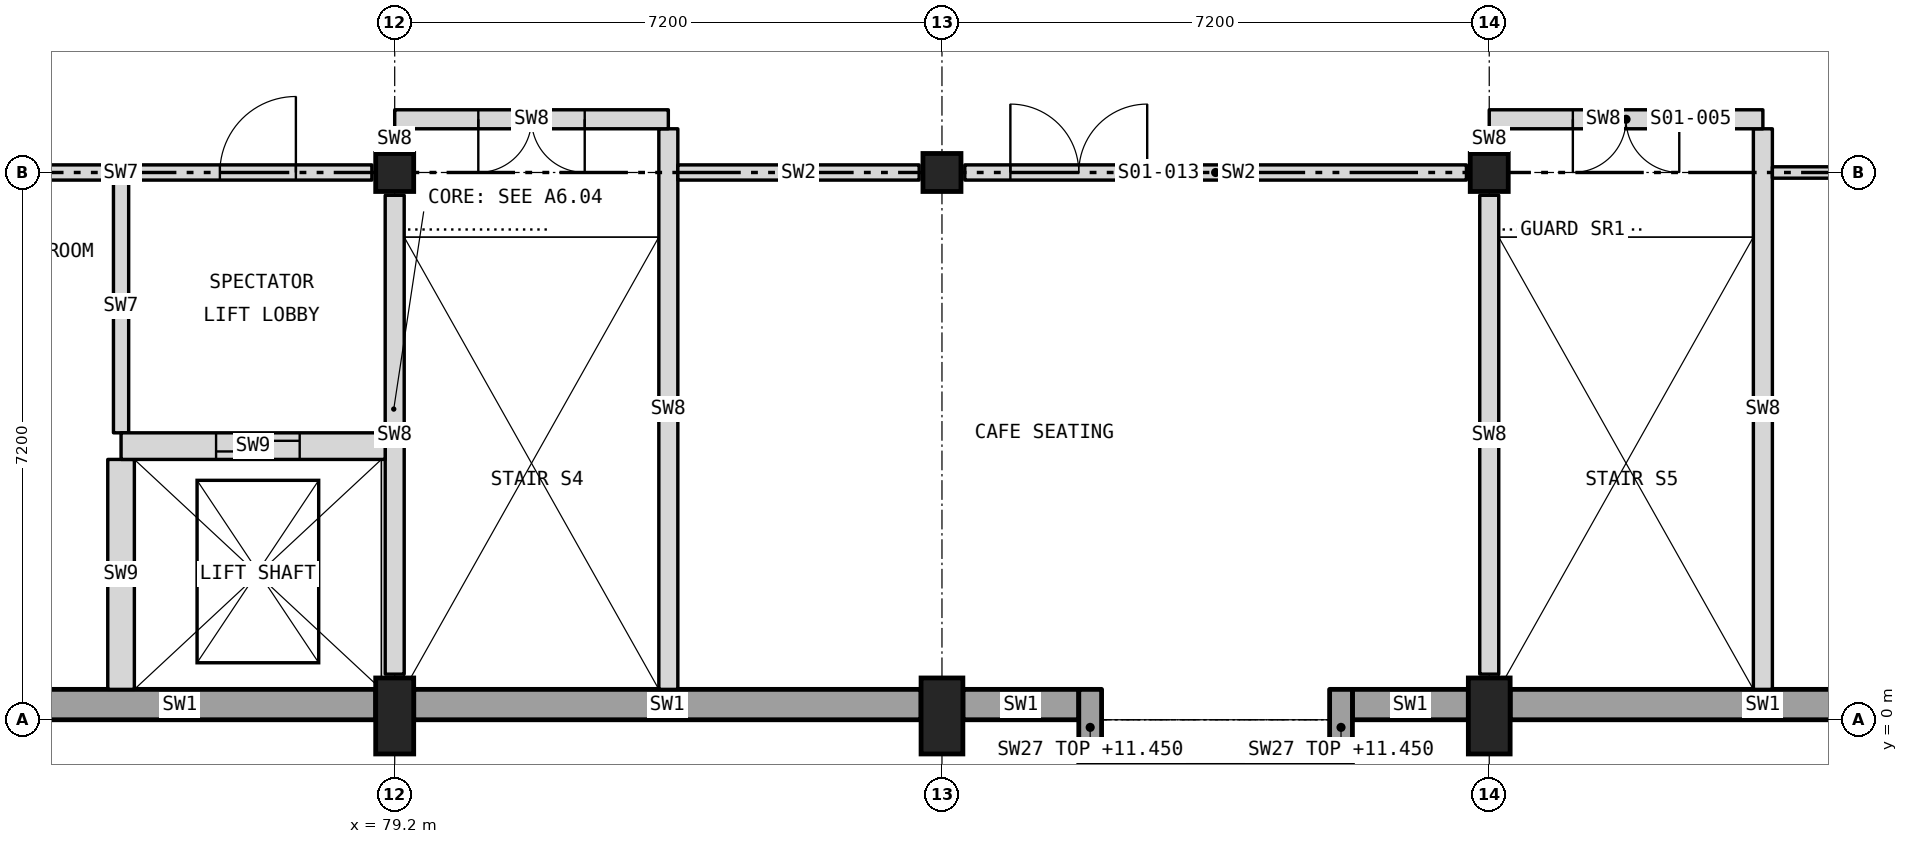
"""IFC4 building model, lengths in metres.
Left out: names, types, materials, properties, quantities, classifications, styles, units other than length and angle.
Written with IfcOpenShell. Run it as: python <this file> out.ifc"""

import sys

from ifc_helpers import new_model, si_unit, direction, frame, frame_2d, origin, origin_2d, place, context, subcontext, project, spatial, rectangle, extrude, element, fill, save


model = new_model("IFC4")
c1 = context("Model", 3, precision=1e-05, world=origin(), true_north=direction((0.0, 1.0)))
c2 = subcontext(c1, "Body", "Model", "MODEL_VIEW")
j1 = project(units=[si_unit("LENGTHUNIT", "METRE"), si_unit("PLANEANGLEUNIT", "RADIAN")], contexts=[c1])
p1 = place(None, origin())
s1 = spatial("IfcSite", under=j1, at=p1, CompositionType="ELEMENT")
p2 = place(p1, origin())
s2 = spatial("IfcBuilding", under=s1, at=p2, CompositionType="ELEMENT")
p3 = place(p2, frame((0.0, 0.0, 6.0)))
s3 = spatial("IfcBuildingStorey", under=s2, at=p3, CompositionType="ELEMENT", Elevation=6.0)
p4 = place(p3, frame((79.2, 0.05, 0.0), z_axis=(0.0, 0.0, 1.0), x_axis=(1.0, 0.0, 0.0)))
e1 = element("IfcColumn", 1, at=p4, inside=s3, PredefinedType="COLUMN", context=c2, shape_type="SweptSolid", body=[
    extrude(rectangle(XDim=0.5, YDim=1.0, at=origin_2d()), origin(), (0.0, 0.0, 1.0), 6.0),
])
p5 = place(p3, frame((79.2, 7.2, 0.0), z_axis=(0.0, 0.0, 1.0), x_axis=(1.0, 0.0, 0.0)))
e2 = element("IfcColumn", 2, at=p5, inside=s3, PredefinedType="COLUMN", context=c2, shape_type="SweptSolid", body=[
    extrude(rectangle(XDim=0.5, YDim=0.5, at=origin_2d()), origin(), (0.0, 0.0, 1.0), 6.0),
])
p6 = place(p3, frame((86.4, 0.05, 0.0), z_axis=(0.0, 0.0, 1.0), x_axis=(1.0, 0.0, 0.0)))
e3 = element("IfcColumn", 3, at=p6, inside=s3, PredefinedType="COLUMN", context=c2, shape_type="SweptSolid", body=[
    extrude(rectangle(XDim=0.55, YDim=1.0, at=origin_2d()), origin(), (0.0, 0.0, 1.0), 6.0),
])
p7 = place(p3, frame((86.4, 7.2, 0.0), z_axis=(0.0, 0.0, 1.0), x_axis=(1.0, 0.0, 0.0)))
e4 = element("IfcColumn", 4, at=p7, inside=s3, PredefinedType="COLUMN", context=c2, shape_type="SweptSolid", body=[
    extrude(rectangle(XDim=0.5, YDim=0.5, at=origin_2d()), origin(), (0.0, 0.0, 1.0), 6.0),
])
p8 = place(p3, frame((93.6, 0.05, 0.0), z_axis=(0.0, 0.0, 1.0), x_axis=(1.0, 0.0, 0.0)))
e5 = element("IfcColumn", 5, at=p8, inside=s3, PredefinedType="COLUMN", context=c2, shape_type="SweptSolid", body=[
    extrude(rectangle(XDim=0.55, YDim=1.0, at=origin_2d()), origin(), (0.0, 0.0, 1.0), 6.0),
])
p9 = place(p3, frame((93.6, 7.2, 0.0), z_axis=(0.0, 0.0, 1.0), x_axis=(1.0, 0.0, 0.0)))
e6 = element("IfcColumn", 6, at=p9, inside=s3, PredefinedType="COLUMN", context=c2, shape_type="SweptSolid", body=[
    extrude(rectangle(XDim=0.5, YDim=0.5, at=origin_2d()), origin(), (0.0, 0.0, 1.0), 6.0),
])
p10 = place(p3, frame((73.8, 0.2, 0.0), z_axis=(0.0, 0.0, 1.0), x_axis=(1.0, 0.0, 0.0)))
e7 = element("IfcWall", 7, at=p10, inside=s3, PredefinedType="SOLIDWALL", context=c2, shape_type="SweptSolid", body=[
    extrude(rectangle(XDim=5.15, YDim=0.4, at=frame_2d((2.575, 0.0))), origin(), (0.0, 0.0, 1.0), 5.725),
])
p11 = place(p3, frame((79.45, 0.2, 0.0), z_axis=(0.0, 0.0, 1.0), x_axis=(1.0, 0.0, 0.0)))
e8 = element("IfcWall", 8, at=p11, inside=s3, PredefinedType="SOLIDWALL", context=c2, shape_type="SweptSolid", body=[
    extrude(rectangle(XDim=6.675, YDim=0.4, at=frame_2d((3.337, 0.0))), origin(), (0.0, 0.0, 1.0), 5.725),
])
for number, where, z_axis, x_axis in (
    (9, (86.675, 0.2, 0.0), (0.0, 0.0, 1.0), (1.0, 0.0, 0.0)),
    (10, (91.8, 0.2, 0.0), (0.0, 0.0, 1.0), (1.0, 0.0, 0.0)),
):
    element("IfcWall", number, at=place(p3, frame(where, z_axis=z_axis, x_axis=x_axis)), inside=s3, PredefinedType="SOLIDWALL", context=c2, shape_type="SweptSolid", body=[
        extrude(rectangle(XDim=1.525, YDim=0.4, at=frame_2d((0.762, 0.0))), origin(), (0.0, 0.0, 1.0), 5.725),
    ])
p12 = place(p3, frame((93.875, 0.2, 0.0), z_axis=(0.0, 0.0, 1.0), x_axis=(1.0, 0.0, 0.0)))
e11 = element("IfcWall", 11, at=p12, inside=s3, PredefinedType="SOLIDWALL", context=c2, shape_type="SweptSolid", body=[
    extrude(rectangle(XDim=6.65, YDim=0.4, at=frame_2d((3.325, 0.0))), origin(), (0.0, 0.0, 1.0), 5.725),
])
p13 = place(p3, frame((88.2, -0.75, 0.0), z_axis=(0.0, 0.0, 1.0), x_axis=(1.0, 0.0, 0.0)))
e12 = element("IfcWall", 12, at=p13, inside=s3, PredefinedType="SOLIDWALL", context=c2, shape_type="SweptSolid", body=[
    extrude(rectangle(XDim=3.6, YDim=0.3, at=frame_2d((1.8, 0.0))), origin(), (0.0, 0.0, 1.0), 5.45),
])
p14 = place(p13, frame((0.3, 0.0, 0.9)))
e13 = element("IfcOpeningElement", 13, at=p14, cuts=e12, PredefinedType="OPENING", context=c2, shape_type="SweptSolid", body=[
    extrude(rectangle(XDim=1.2, YDim=3.6, at=frame_2d((0.6, 1.8))), frame((0.0, 0.16, 0.0), z_axis=(0.0, -1.0, 0.0), x_axis=(1.0, 0.0, 0.0)), (0.0, 0.0, 1.0), 0.32),
])
p15 = place(p13, frame((2.1, 0.0, 0.9)))
e14 = element("IfcOpeningElement", 14, at=p15, cuts=e12, PredefinedType="OPENING", context=c2, shape_type="SweptSolid", body=[
    extrude(rectangle(XDim=1.2, YDim=3.6, at=frame_2d((0.6, 1.8))), frame((0.0, 0.16, 0.0), z_axis=(0.0, -1.0, 0.0), x_axis=(1.0, 0.0, 0.0)), (0.0, 0.0, 1.0), 0.32),
])
for number, where, z_axis, x_axis in (
    (15, (88.35, -0.6, 0.0), (0.0, 0.0, 1.0), (0.0, 1.0, 0.0)),
    (16, (91.65, -0.6, 0.0), (0.0, 0.0, 1.0), (0.0, 1.0, 0.0)),
):
    element("IfcWall", number, at=place(p3, frame(where, z_axis=z_axis, x_axis=x_axis)), inside=s3, PredefinedType="SOLIDWALL", context=c2, shape_type="SweptSolid", body=[
        extrude(rectangle(XDim=1.0, YDim=0.3, at=frame_2d((0.5, 0.0))), origin(), (0.0, 0.0, 1.0), 5.45),
    ])
p16 = place(p3, frame((75.6, 0.4, 0.0), z_axis=(0.0, 0.0, 1.0), x_axis=(0.0, 1.0, 0.0)))
e17 = element("IfcWall", 17, at=p16, inside=s3, PredefinedType="SOLIDWALL", context=c2, shape_type="SweptSolid", body=[
    extrude(rectangle(XDim=3.025, YDim=0.35, at=frame_2d((1.513, 0.0))), origin(), (0.0, 0.0, 1.0), 5.725),
])
p17 = place(p3, frame((75.6, 3.775, 0.0), z_axis=(0.0, 0.0, 1.0), x_axis=(0.0, 1.0, 0.0)))
e18 = element("IfcWall", 18, at=p17, inside=s3, PredefinedType="PARTITIONING", context=c2, shape_type="SweptSolid", body=[
    extrude(rectangle(XDim=3.325, YDim=0.2, at=frame_2d((1.663, 0.0))), origin(), (0.0, 0.0, 1.0), 5.725),
])
p18 = place(p3, frame((79.2, 0.6, 0.0), z_axis=(0.0, 0.0, 1.0), x_axis=(0.0, 1.0, 0.0)))
e19 = element("IfcWall", 19, at=p18, inside=s3, PredefinedType="SOLIDWALL", context=c2, shape_type="SweptSolid", body=[
    extrude(rectangle(XDim=6.3, YDim=0.25, at=frame_2d((3.15, 0.0))), origin(), (0.0, 0.0, 1.0), 5.725),
])
p19 = place(p3, frame((79.2, 7.5, 0.0), z_axis=(0.0, 0.0, 1.0), x_axis=(0.0, 1.0, 0.0)))
e20 = element("IfcWall", 20, at=p19, inside=s3, PredefinedType="SOLIDWALL", context=c2, shape_type="SweptSolid", body=[
    extrude(rectangle(XDim=0.275, YDim=0.25, at=frame_2d((0.137, 0.0))), origin(), (0.0, 0.0, 1.0), 5.725),
])
p20 = place(p3, frame((82.8, 0.4, 0.0), z_axis=(0.0, 0.0, 1.0), x_axis=(0.0, 1.0, 0.0)))
e21 = element("IfcWall", 21, at=p20, inside=s3, PredefinedType="SOLIDWALL", context=c2, shape_type="SweptSolid", body=[
    extrude(rectangle(XDim=7.375, YDim=0.25, at=frame_2d((3.688, 0.0))), origin(), (0.0, 0.0, 1.0), 5.725),
])
p21 = place(p3, frame((93.6, 0.6, 0.0), z_axis=(0.0, 0.0, 1.0), x_axis=(0.0, 1.0, 0.0)))
e22 = element("IfcWall", 22, at=p21, inside=s3, PredefinedType="SOLIDWALL", context=c2, shape_type="SweptSolid", body=[
    extrude(rectangle(XDim=6.3, YDim=0.25, at=frame_2d((3.15, 0.0))), origin(), (0.0, 0.0, 1.0), 5.725),
])
p22 = place(p3, frame((93.6, 7.5, 0.0), z_axis=(0.0, 0.0, 1.0), x_axis=(0.0, 1.0, 0.0)))
e23 = element("IfcWall", 23, at=p22, inside=s3, PredefinedType="SOLIDWALL", context=c2, shape_type="SweptSolid", body=[
    extrude(rectangle(XDim=0.275, YDim=0.25, at=frame_2d((0.137, 0.0))), origin(), (0.0, 0.0, 1.0), 5.725),
])
p23 = place(p3, frame((97.2, 0.4, 0.0), z_axis=(0.0, 0.0, 1.0), x_axis=(0.0, 1.0, 0.0)))
e24 = element("IfcWall", 24, at=p23, inside=s3, PredefinedType="SOLIDWALL", context=c2, shape_type="SweptSolid", body=[
    extrude(rectangle(XDim=7.375, YDim=0.25, at=frame_2d((3.688, 0.0))), origin(), (0.0, 0.0, 1.0), 5.725),
])
p24 = place(p3, frame((75.6, 3.6, 0.0), z_axis=(0.0, 0.0, 1.0), x_axis=(1.0, 0.0, 0.0)))
e25 = element("IfcWall", 25, at=p24, inside=s3, PredefinedType="SOLIDWALL", context=c2, shape_type="SweptSolid", body=[
    extrude(rectangle(XDim=3.475, YDim=0.35, at=frame_2d((1.737, 0.0))), origin(), (0.0, 0.0, 1.0), 5.725),
])
p25 = place(p24, frame((1.25, 0.0, 0.0)))
e26 = element("IfcOpeningElement", 26, at=p25, cuts=e25, PredefinedType="OPENING", context=c2, shape_type="SweptSolid", body=[
    extrude(rectangle(XDim=1.1, YDim=2.1, at=frame_2d((0.55, 1.05))), frame((0.0, 0.185, 0.0), z_axis=(0.0, -1.0, 0.0), x_axis=(1.0, 0.0, 0.0)), (0.0, 0.0, 1.0), 0.37),
])
p26 = place(p3, frame((72.3, 7.2, 0.0), z_axis=(0.0, 0.0, 1.0), x_axis=(1.0, 0.0, 0.0)))
e27 = element("IfcWall", 27, at=p26, inside=s3, PredefinedType="PARTITIONING", context=c2, shape_type="SweptSolid", body=[
    extrude(rectangle(XDim=6.6, YDim=0.2, at=frame_2d((3.3, 0.0))), origin(), (0.0, 0.0, 1.0), 5.725),
])
p27 = place(p26, frame((0.15, 0.0, 0.0)))
e28 = element("IfcOpeningElement", 28, at=p27, cuts=e27, PredefinedType="OPENING", context=c2, shape_type="SweptSolid", body=[
    extrude(rectangle(XDim=0.9, YDim=2.1, at=frame_2d((0.45, 1.05))), frame((0.0, 0.11, 0.0), z_axis=(0.0, -1.0, 0.0), x_axis=(1.0, 0.0, 0.0)), (0.0, 0.0, 1.0), 0.22),
])
p28 = place(p26, frame((4.6, 0.0, 0.0)))
e29 = element("IfcOpeningElement", 29, at=p28, cuts=e27, PredefinedType="OPENING", context=c2, shape_type="SweptSolid", body=[
    extrude(rectangle(XDim=1.0, YDim=2.1, at=frame_2d((0.5, 1.05))), frame((0.0, 0.11, 0.0), z_axis=(0.0, -1.0, 0.0), x_axis=(1.0, 0.0, 0.0)), (0.0, 0.0, 1.0), 0.22),
])
p29 = place(p3, frame((97.325, 7.2, 0.0), z_axis=(0.0, 0.0, 1.0), x_axis=(1.0, 0.0, 0.0)))
e30 = element("IfcWall", 30, at=p29, inside=s3, PredefinedType="PARTITIONING", context=c2, shape_type="SweptSolid", body=[
    extrude(rectangle(XDim=3.175, YDim=0.15, at=frame_2d((1.587, 0.0))), origin(), (0.0, 0.0, 1.0), 5.725),
])
p30 = place(p3, frame((82.925, 7.2, 0.0), z_axis=(0.0, 0.0, 1.0), x_axis=(1.0, 0.0, 0.0)))
e31 = element("IfcWall", 31, at=p30, inside=s3, PredefinedType="PARTITIONING", context=c2, shape_type="SweptSolid", body=[
    extrude(rectangle(XDim=3.175, YDim=0.2, at=frame_2d((1.587, 0.0))), origin(), (0.0, 0.0, 1.0), 5.725),
])
p31 = place(p3, frame((86.7, 7.2, 0.0), z_axis=(0.0, 0.0, 1.0), x_axis=(1.0, 0.0, 0.0)))
e32 = element("IfcWall", 32, at=p31, inside=s3, PredefinedType="PARTITIONING", context=c2, shape_type="SweptSolid", body=[
    extrude(rectangle(XDim=6.6, YDim=0.2, at=frame_2d((3.3, 0.0))), origin(), (0.0, 0.0, 1.0), 5.725),
])
p32 = place(p31, frame((0.6, 0.0, 0.0)))
e33 = element("IfcOpeningElement", 33, at=p32, cuts=e32, PredefinedType="OPENING", context=c2, shape_type="SweptSolid", body=[
    extrude(rectangle(XDim=1.8, YDim=2.1, at=frame_2d((0.9, 1.05))), frame((0.0, 0.11, 0.0), z_axis=(0.0, -1.0, 0.0), x_axis=(1.0, 0.0, 0.0)), (0.0, 0.0, 1.0), 0.22),
])
p33 = place(p3, frame((79.2, 7.9, 0.0), z_axis=(0.0, 0.0, 1.0), x_axis=(1.0, 0.0, 0.0)))
e34 = element("IfcWall", 34, at=p33, inside=s3, PredefinedType="SOLIDWALL", context=c2, shape_type="SweptSolid", body=[
    extrude(rectangle(XDim=3.6, YDim=0.25, at=frame_2d((1.8, 0.0))), origin(), (0.0, 0.0, 1.0), 5.725),
])
p34 = place(p33, frame((1.1, 0.0, 0.0)))
e35 = element("IfcOpeningElement", 35, at=p34, cuts=e34, PredefinedType="OPENING", context=c2, shape_type="SweptSolid", body=[
    extrude(rectangle(XDim=1.4, YDim=2.1, at=frame_2d((0.7, 1.05))), frame((0.0, 0.135, 0.0), z_axis=(0.0, -1.0, 0.0), x_axis=(1.0, 0.0, 0.0)), (0.0, 0.0, 1.0), 0.27),
])
p35 = place(p3, frame((93.6, 7.9, 0.0), z_axis=(0.0, 0.0, 1.0), x_axis=(1.0, 0.0, 0.0)))
e36 = element("IfcWall", 36, at=p35, inside=s3, PredefinedType="SOLIDWALL", context=c2, shape_type="SweptSolid", body=[
    extrude(rectangle(XDim=3.6, YDim=0.25, at=frame_2d((1.8, 0.0))), origin(), (0.0, 0.0, 1.0), 5.725),
])
p36 = place(p35, frame((1.1, 0.0, 0.0)))
e37 = element("IfcOpeningElement", 37, at=p36, cuts=e36, PredefinedType="OPENING", context=c2, shape_type="SweptSolid", body=[
    extrude(rectangle(XDim=1.4, YDim=2.1, at=frame_2d((0.7, 1.05))), frame((0.0, 0.135, 0.0), z_axis=(0.0, -1.0, 0.0), x_axis=(1.0, 0.0, 0.0)), (0.0, 0.0, 1.0), 0.27),
])
p37 = place(p34, frame((1.4, 0.0, 0.0), z_axis=(0.0, 0.0, 1.0), x_axis=(-1.0, 0.0, 0.0)))
e38 = element("IfcDoor", 38, at=p37, inside=s3, OperationType="DOUBLE_DOOR_SINGLE_SWING", PredefinedType="DOOR", context=c2, shape_type="SweptSolid", body=[
    extrude(rectangle(XDim=1.4, YDim=2.1, at=frame_2d((0.7, 1.05))), frame((0.0, 0.025, 0.0), z_axis=(0.0, -1.0, 0.0), x_axis=(1.0, 0.0, 0.0)), (0.0, 0.0, 1.0), 0.05),
])
fill(e35, e38)
p38 = place(p36, frame((1.4, 0.0, 0.0), z_axis=(0.0, 0.0, 1.0), x_axis=(-1.0, 0.0, 0.0)))
e39 = element("IfcDoor", 39, at=p38, inside=s3, OperationType="DOUBLE_DOOR_SINGLE_SWING", PredefinedType="DOOR", context=c2, shape_type="SweptSolid", body=[
    extrude(rectangle(XDim=1.4, YDim=2.1, at=frame_2d((0.7, 1.05))), frame((0.0, 0.025, 0.0), z_axis=(0.0, -1.0, 0.0), x_axis=(1.0, 0.0, 0.0)), (0.0, 0.0, 1.0), 0.05),
])
fill(e37, e39)
p39 = place(p32, origin())
e40 = element("IfcDoor", 40, at=p39, inside=s3, OperationType="DOUBLE_DOOR_SINGLE_SWING", PredefinedType="DOOR", context=c2, shape_type="SweptSolid", body=[
    extrude(rectangle(XDim=1.8, YDim=2.1, at=frame_2d((0.9, 1.05))), frame((0.0, 0.025, 0.0), z_axis=(0.0, -1.0, 0.0), x_axis=(1.0, 0.0, 0.0)), (0.0, 0.0, 1.0), 0.05),
])
fill(e33, e40)
p40 = place(p28, origin())
e41 = element("IfcDoor", 41, at=p40, inside=s3, OperationType="SINGLE_SWING_RIGHT", PredefinedType="DOOR", context=c2, shape_type="SweptSolid", body=[
    extrude(rectangle(XDim=1.0, YDim=2.1, at=frame_2d((0.5, 1.05))), frame((0.0, 0.025, 0.0), z_axis=(0.0, -1.0, 0.0), x_axis=(1.0, 0.0, 0.0)), (0.0, 0.0, 1.0), 0.05),
])
fill(e29, e41)
p41 = place(p25, origin())
e42 = element("IfcDoor", 42, at=p41, inside=s3, OperationType="DOUBLE_DOOR_SLIDING", PredefinedType="DOOR", context=c2, shape_type="SweptSolid", body=[
    extrude(rectangle(XDim=1.1, YDim=2.1, at=frame_2d((0.55, 1.05))), frame((0.0, 0.025, 0.0), z_axis=(0.0, -1.0, 0.0), x_axis=(1.0, 0.0, 0.0)), (0.0, 0.0, 1.0), 0.05),
])
fill(e26, e42)
save(model, sys.argv[1])
